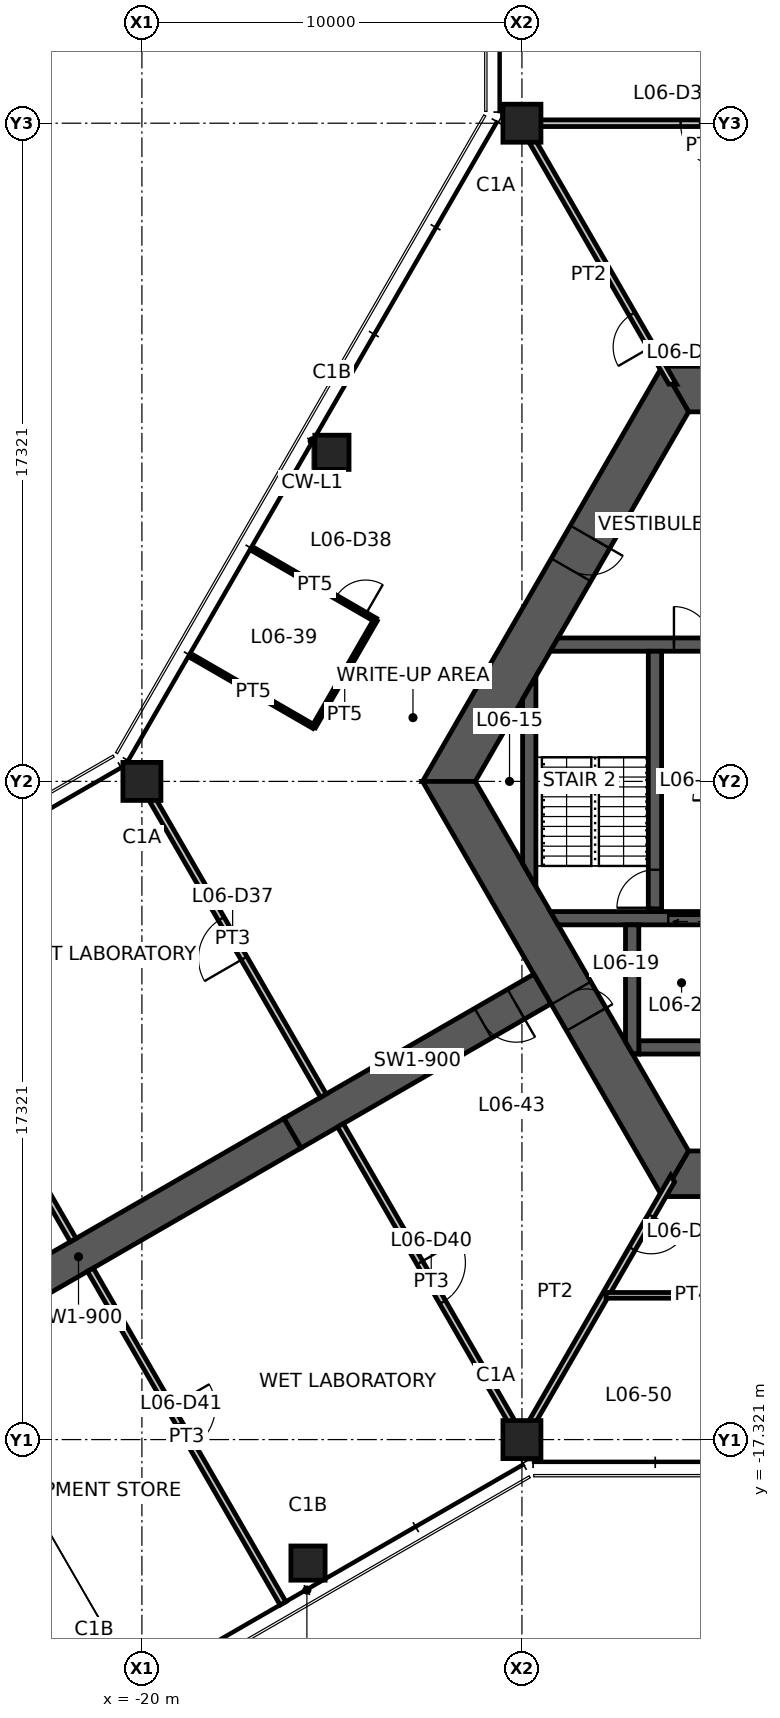
"""IFC4 building model, lengths in metres.
Left out: names, types, materials, properties, quantities, classifications, styles, units other than length and angle.
Written with IfcOpenShell. Run it as: python <this file> out.ifc"""

import sys

from ifc_helpers import new_model, si_unit, direction, frame, frame_2d, origin, origin_2d, place, context, subcontext, project, spatial, polyline, rectangle, hollow_rectangle, outline, extrude, element, fill, save


model = new_model("IFC4")
c1 = context("Model", 3, precision=1e-05, world=origin(), true_north=direction((0.0, 1.0)))
c2 = subcontext(c1, "Body", "Model", "MODEL_VIEW")
j1 = project(units=[si_unit("LENGTHUNIT", "METRE"), si_unit("PLANEANGLEUNIT", "RADIAN")], contexts=[c1])
p1 = place(None, origin())
s1 = spatial("IfcSite", under=j1, at=p1, CompositionType="ELEMENT")
p2 = place(p1, origin())
s2 = spatial("IfcBuilding", under=s1, at=p2, CompositionType="ELEMENT")
p3 = place(p2, frame((0.0, 0.0, 22.6)))
s3 = spatial("IfcBuildingStorey", under=s2, at=p3, CompositionType="ELEMENT", Elevation=22.6)
for number, where, z_axis, x_axis in (
    (1, (-10.0, 17.321, 0.0), (0.0, 0.0, 1.0), (1.0, 0.0, 0.0)),
    (2, (-20.0, 0.0, 0.0), (0.0, 0.0, 1.0), (1.0, 0.0, 0.0)),
    (3, (-10.0, -17.321, 0.0), (0.0, 0.0, 1.0), (1.0, 0.0, 0.0)),
):
    element("IfcColumn", number, at=place(p3, frame(where, z_axis=z_axis, x_axis=x_axis)), inside=s3, PredefinedType="COLUMN", context=c2, shape_type="SweptSolid", body=[
        extrude(hollow_rectangle(XDim=1.0, YDim=1.0, WallThickness=0.06, at=origin_2d()), origin(), (0.0, 0.0, 1.0), 4.2),
    ])
for number, where, z_axis, x_axis in (
    (4, (-15.0, 8.66, 0.0), (0.0, 0.0, 1.0), (1.0, 0.0, 0.0)),
    (5, (-15.629, -20.571, 0.0), (0.0, 0.0, 1.0), (1.0, 0.0, 0.0)),
):
    element("IfcColumn", number, at=place(p3, frame(where, z_axis=z_axis, x_axis=x_axis)), inside=s3, PredefinedType="COLUMN", context=c2, shape_type="SweptSolid", body=[
        extrude(hollow_rectangle(XDim=0.9, YDim=0.9, WallThickness=0.05, at=origin_2d()), origin(), (0.0, 0.0, 1.0), 4.2),
    ])
p4 = place(p3, frame((5.961, 10.325, 0.0), z_axis=(0.0, 0.0, 1.0), x_axis=(-1.0, 0.0, 0.0)))
e6 = element("IfcWall", 6, at=p4, inside=s3, PredefinedType="SHEAR", context=c2, shape_type="SweptSolid", body=[
    extrude(outline(polyline([(-0.346, -0.6), (4.574, -0.6), (5.474, -0.6), (6.449, -0.6), (7.349, -0.6), (12.269, -0.6), (11.576, 0.6), (7.349, 0.6), (6.449, 0.6), (5.474, 0.6), (4.574, 0.6), (0.346, 0.6), (-0.346, -0.6)])), origin(), (0.0, 0.0, 1.0), 4.2),
])
p5 = place(p4, frame((6.449, 0.0, 0.0)))
e7 = element("IfcOpeningElement", 7, at=p5, cuts=e6, PredefinedType="OPENING", context=c2, shape_type="SweptSolid", body=[
    extrude(rectangle(XDim=0.9, YDim=2.1, at=frame_2d((0.45, 1.05))), frame((0.0, 0.61, 0.0), z_axis=(0.0, -1.0, 0.0), x_axis=(1.0, 0.0, 0.0)), (0.0, 0.0, 1.0), 1.22),
])
p6 = place(p4, frame((4.574, 0.0, 0.0)))
e8 = element("IfcOpeningElement", 8, at=p6, cuts=e6, PredefinedType="OPENING", context=c2, shape_type="SweptSolid", body=[
    extrude(rectangle(XDim=0.9, YDim=2.1, at=frame_2d((0.45, 1.05))), frame((0.0, 0.61, 0.0), z_axis=(0.0, -1.0, 0.0), x_axis=(1.0, 0.0, 0.0)), (0.0, 0.0, 1.0), 1.22),
])
p7 = place(p3, frame((-5.961, 10.325, 0.0), z_axis=(0.0, 0.0, 1.0), x_axis=(-0.500004296715, -0.866022923061, 0.0)))
e9 = element("IfcWall", 9, at=p7, inside=s3, PredefinedType="SHEAR", context=c2, shape_type="SweptSolid", body=[
    extrude(outline(polyline([(-0.346, -0.6), (4.494, -0.6), (5.494, -0.6), (12.269, -0.6), (11.576, 0.6), (5.494, 0.6), (4.494, 0.6), (0.346, 0.6), (-0.346, -0.6)])), origin(), (0.0, 0.0, 1.0), 4.2),
])
p8 = place(p7, frame((4.494, 0.0, 0.0)))
e10 = element("IfcOpeningElement", 10, at=p8, cuts=e9, PredefinedType="OPENING", context=c2, shape_type="SweptSolid", body=[
    extrude(rectangle(XDim=1.0, YDim=2.1, at=frame_2d((0.5, 1.05))), frame((0.0, 0.61, 0.0), z_axis=(0.0, -1.0, 0.0), x_axis=(1.0, 0.0, 0.0)), (0.0, 0.0, 1.0), 1.22),
])
p9 = place(p3, frame((-11.922, 0.0, 0.0), z_axis=(0.0, 0.0, 1.0), x_axis=(0.500004296715, -0.866022923061, 0.0)))
e11 = element("IfcWall", 11, at=p9, inside=s3, PredefinedType="SHEAR", context=c2, shape_type="SweptSolid", body=[
    extrude(outline(polyline([(-0.346, -0.6), (6.431, -0.6), (7.231, -0.6), (12.269, -0.6), (11.576, 0.6), (7.231, 0.6), (6.431, 0.6), (0.346, 0.6), (-0.346, -0.6)])), origin(), (0.0, 0.0, 1.0), 4.2),
])
p10 = place(p9, frame((6.431, 0.0, 0.0)))
e12 = element("IfcOpeningElement", 12, at=p10, cuts=e11, PredefinedType="OPENING", context=c2, shape_type="SweptSolid", body=[
    extrude(rectangle(XDim=0.8, YDim=2.1, at=frame_2d((0.4, 1.05))), frame((0.0, 0.61, 0.0), z_axis=(0.0, -1.0, 0.0), x_axis=(1.0, 0.0, 0.0)), (0.0, 0.0, 1.0), 1.22),
])
p11 = place(p3, frame((-5.961, -10.325, 0.0), z_axis=(0.0, 0.0, 1.0), x_axis=(1.0, 0.0, 0.0)))
e13 = element("IfcWall", 13, at=p11, inside=s3, PredefinedType="SHEAR", context=c2, shape_type="SweptSolid", body=[
    extrude(outline(polyline([(-0.346, -0.6), (5.461, -0.6), (6.461, -0.6), (12.269, -0.6), (11.576, 0.6), (6.461, 0.6), (5.461, 0.6), (0.346, 0.6), (-0.346, -0.6)])), origin(), (0.0, 0.0, 1.0), 4.2),
])
p12 = place(p11, frame((5.461, 0.0, 0.0)))
e14 = element("IfcOpeningElement", 14, at=p12, cuts=e13, PredefinedType="OPENING", context=c2, shape_type="SweptSolid", body=[
    extrude(rectangle(XDim=1.0, YDim=2.1, at=frame_2d((0.5, 1.05))), frame((0.0, 0.61, 0.0), z_axis=(0.0, -1.0, 0.0), x_axis=(1.0, 0.0, 0.0)), (0.0, 0.0, 1.0), 1.22),
])
p13 = place(p3, frame((-9.461, -5.462, 0.0), z_axis=(0.0, 0.0, 1.0), x_axis=(-0.866019116917, -0.500010889016, 0.0)))
e15 = element("IfcWall", 15, at=p13, inside=s3, PredefinedType="SHEAR", context=c2, shape_type="SweptSolid", body=[
    extrude(rectangle(XDim=7.595, YDim=0.9, at=frame_2d((3.798, 0.0))), origin(), (0.0, 0.0, 1.0), 4.2),
])
p14 = place(p13, frame((0.8, 0.0, 0.0)))
e16 = element("IfcOpeningElement", 16, at=p14, cuts=e15, PredefinedType="OPENING", context=c2, shape_type="SweptSolid", body=[
    extrude(rectangle(XDim=1.0, YDim=2.1, at=frame_2d((0.5, 1.05))), frame((0.0, 0.46, 0.0), z_axis=(0.0, -1.0, 0.0), x_axis=(1.0, 0.0, 0.0)), (0.0, 0.0, 1.0), 0.92),
])
p15 = place(p3, frame((-16.039, -9.26, 0.0), z_axis=(0.0, 0.0, 1.0), x_axis=(-0.866024837091, -0.50000098154, 0.0)))
e17 = element("IfcWall", 17, at=p15, inside=s3, PredefinedType="SHEAR", context=c2, shape_type="SweptSolid", body=[
    extrude(rectangle(XDim=13.0, YDim=0.9, at=frame_2d((6.5, 0.0))), origin(), (0.0, 0.0, 1.0), 4.2),
])
p16 = place(p3, frame((-9.151, 3.6, 0.0), z_axis=(0.0, 0.0, 1.0), x_axis=(1.0, 0.0, 0.0)))
e18 = element("IfcWall", 18, at=p16, inside=s3, PredefinedType="SHEAR", context=c2, shape_type="SweptSolid", body=[
    extrude(outline(polyline([(-0.101, -0.175), (3.151, -0.175), (4.151, -0.175), (7.726, -0.175), (7.726, 0.175), (4.151, 0.175), (3.151, 0.175), (0.101, 0.175), (-0.101, -0.175)])), origin(), (0.0, 0.0, 1.0), 4.2),
])
p17 = place(p16, frame((3.151, 0.0, 0.0)))
e19 = element("IfcOpeningElement", 19, at=p17, cuts=e18, PredefinedType="OPENING", context=c2, shape_type="SweptSolid", body=[
    extrude(rectangle(XDim=1.0, YDim=2.1, at=frame_2d((0.5, 1.05))), frame((0.0, 0.185, 0.0), z_axis=(0.0, -1.0, 0.0), x_axis=(1.0, 0.0, 0.0)), (0.0, 0.0, 1.0), 0.37),
])
p18 = place(p3, frame((-9.151, -3.6, 0.0), z_axis=(0.0, 0.0, 1.0), x_axis=(1.0, 0.0, 0.0)))
e20 = element("IfcWall", 20, at=p18, inside=s3, PredefinedType="SHEAR", context=c2, shape_type="SweptSolid", body=[
    extrude(outline(polyline([(0.101, -0.175), (3.001, -0.175), (4.301, -0.175), (7.726, -0.175), (7.726, 0.175), (4.301, 0.175), (3.001, 0.175), (-0.101, 0.175), (0.101, -0.175)])), origin(), (0.0, 0.0, 1.0), 4.2),
])
p19 = place(p18, frame((3.001, 0.0, 0.0)))
e21 = element("IfcOpeningElement", 21, at=p19, cuts=e20, PredefinedType="OPENING", context=c2, shape_type="SweptSolid", body=[
    extrude(rectangle(XDim=1.3, YDim=2.1, at=frame_2d((0.65, 1.05))), frame((0.0, 0.185, 0.0), z_axis=(0.0, -1.0, 0.0), x_axis=(1.0, 0.0, 0.0)), (0.0, 0.0, 1.0), 0.37),
])
p20 = place(p3, frame((-6.5, -3.425, 0.0), z_axis=(0.0, 0.0, 1.0), x_axis=(0.0, 1.0, 0.0)))
e22 = element("IfcWall", 22, at=p20, inside=s3, PredefinedType="SHEAR", context=c2, shape_type="SweptSolid", body=[
    extrude(rectangle(XDim=6.85, YDim=0.35, at=frame_2d((3.425, 0.0))), origin(), (0.0, 0.0, 1.0), 4.2),
])
p21 = place(p20, frame((0.1, 0.0, 0.0)))
e23 = element("IfcOpeningElement", 23, at=p21, cuts=e22, PredefinedType="OPENING", context=c2, shape_type="SweptSolid", body=[
    extrude(rectangle(XDim=1.0, YDim=2.1, at=frame_2d((0.5, 1.05))), frame((0.0, 0.185, 0.0), z_axis=(0.0, -1.0, 0.0), x_axis=(1.0, 0.0, 0.0)), (0.0, 0.0, 1.0), 0.37),
])
p22 = place(p3, frame((-6.925, -7.0, 0.0), z_axis=(0.0, 0.0, 1.0), x_axis=(1.0, 0.0, 0.0)))
e24 = element("IfcWall", 24, at=p22, inside=s3, PredefinedType="SHEAR", context=c2, shape_type="SweptSolid", body=[
    extrude(rectangle(XDim=2.25, YDim=0.35, at=frame_2d((1.125, 0.0))), origin(), (0.0, 0.0, 1.0), 4.2),
])
p23 = place(p3, frame((-7.1, -3.775, 0.0), z_axis=(0.0, 0.0, 1.0), x_axis=(0.0, -1.0, 0.0)))
e25 = element("IfcWall", 25, at=p23, inside=s3, PredefinedType="SHEAR", context=c2, shape_type="SweptSolid", body=[
    extrude(outline(polyline([(0.0, -0.175), (3.074, -0.175), (3.377, 0.0), (3.4, 0.175), (0.0, 0.175), (0.0, -0.175)])), origin(), (0.0, 0.0, 1.0), 4.2),
])
p24 = place(p3, frame((-9.808, -2.462, 0.0), z_axis=(0.0, 0.0, 1.0), x_axis=(0.0, 1.0, 0.0)))
e26 = element("IfcWall", 26, at=p24, inside=s3, PredefinedType="SHEAR", context=c2, shape_type="SweptSolid", body=[
    extrude(outline(polyline([(-0.303, -0.175), (5.228, -0.175), (4.621, 0.175), (0.303, 0.175), (-0.303, -0.175)])), origin(), (0.0, 0.0, 1.0), 4.2),
])
p25 = place(p3, frame((-6.035, 10.453, 0.0), z_axis=(0.0, 0.0, 1.0), x_axis=(-0.499993402427, 0.866029212861, 0.0)))
e27 = element("IfcWall", 27, at=p25, inside=s3, PredefinedType="PARTITIONING", context=c2, shape_type="SweptSolid", body=[
    extrude(outline(polyline([(-0.051, -0.087), (1.129, -0.087), (2.129, -0.087), (7.93, -0.087), (7.93, 0.087), (2.129, 0.087), (1.129, 0.087), (0.051, 0.087), (-0.051, -0.087)])), origin(), (0.0, 0.0, 1.0), 3.3),
])
p26 = place(p25, frame((1.129, 0.0, 0.0)))
e28 = element("IfcOpeningElement", 28, at=p26, cuts=e27, PredefinedType="OPENING", context=c2, shape_type="SweptSolid", body=[
    extrude(rectangle(XDim=1.0, YDim=2.1, at=frame_2d((0.5, 1.05))), frame((0.0, 0.098, 0.0), z_axis=(0.0, -1.0, 0.0), x_axis=(1.0, 0.0, 0.0)), (0.0, 0.0, 1.0), 0.195),
])
p27 = place(p3, frame((-6.035, -10.453, 0.0), z_axis=(0.0, 0.0, 1.0), x_axis=(-0.499993402427, -0.866029212861, 0.0)))
e29 = element("IfcWall", 29, at=p27, inside=s3, PredefinedType="PARTITIONING", context=c2, shape_type="SweptSolid", body=[
    extrude(outline(polyline([(-0.051, -0.087), (1.129, -0.087), (2.129, -0.087), (7.93, -0.087), (7.93, 0.087), (2.129, 0.087), (1.129, 0.087), (0.051, 0.087), (-0.051, -0.087)])), origin(), (0.0, 0.0, 1.0), 3.3),
])
p28 = place(p27, frame((1.129, 0.0, 0.0)))
e30 = element("IfcOpeningElement", 30, at=p28, cuts=e29, PredefinedType="OPENING", context=c2, shape_type="SweptSolid", body=[
    extrude(rectangle(XDim=1.0, YDim=2.1, at=frame_2d((0.5, 1.05))), frame((0.0, 0.098, 0.0), z_axis=(0.0, -1.0, 0.0), x_axis=(1.0, 0.0, 0.0)), (0.0, 0.0, 1.0), 0.195),
])
p29 = place(p3, frame((-0.45, 17.321, 0.0), z_axis=(0.0, 0.0, 1.0), x_axis=(-1.0, 0.0, 0.0)))
e31 = element("IfcWall", 31, at=p29, inside=s3, PredefinedType="PARTITIONING", context=c2, shape_type="SweptSolid", body=[
    extrude(rectangle(XDim=9.55, YDim=0.175, at=frame_2d((4.775, 0.0))), origin(), (0.0, 0.0, 1.0), 3.208),
])
p30 = place(p29, frame((4.175, 0.0, 0.0)))
e32 = element("IfcOpeningElement", 32, at=p30, cuts=e31, PredefinedType="OPENING", context=c2, shape_type="SweptSolid", body=[
    extrude(rectangle(XDim=1.2, YDim=2.1, at=frame_2d((0.6, 1.05))), frame((0.0, 0.098, 0.0), z_axis=(0.0, -1.0, 0.0), x_axis=(1.0, 0.0, 0.0)), (0.0, 0.0, 1.0), 0.195),
])
p31 = place(p3, frame((-15.225, -8.271, 0.0), z_axis=(0.0, 0.0, 1.0), x_axis=(-0.499993908199, 0.866028920859, 0.0)))
e33 = element("IfcWall", 33, at=p31, inside=s3, PredefinedType="PARTITIONING", context=c2, shape_type="SweptSolid", body=[
    extrude(rectangle(XDim=9.55, YDim=0.175, at=frame_2d((4.775, 0.0))), origin(), (0.0, 0.0, 1.0), 3.208),
])
p32 = place(p31, frame((4.175, 0.0, 0.0)))
e34 = element("IfcOpeningElement", 34, at=p32, cuts=e33, PredefinedType="OPENING", context=c2, shape_type="SweptSolid", body=[
    extrude(rectangle(XDim=1.2, YDim=2.1, at=frame_2d((0.6, 1.05))), frame((0.0, 0.098, 0.0), z_axis=(0.0, -1.0, 0.0), x_axis=(1.0, 0.0, 0.0)), (0.0, 0.0, 1.0), 0.195),
])
p33 = place(p3, frame((-17.048, 6.094, 0.0), z_axis=(0.0, 0.0, 1.0), x_axis=(0.866040157966, -0.499974444137, 0.0)))
e35 = element("IfcWall", 35, at=p33, inside=s3, PredefinedType="PARTITIONING", context=c2, shape_type="SweptSolid", body=[
    extrude(rectangle(XDim=3.69, YDim=0.1, at=frame_2d((1.845, 0.0))), origin(), (0.0, 0.0, 1.0), 3.2),
])
p34 = place(p33, frame((2.49, 0.0, 0.0)))
e36 = element("IfcOpeningElement", 36, at=p34, cuts=e35, PredefinedType="OPENING", context=c2, shape_type="SweptSolid", body=[
    extrude(rectangle(XDim=0.9, YDim=2.1, at=frame_2d((0.45, 1.05))), frame((0.0, 0.06, 0.0), z_axis=(0.0, -1.0, 0.0), x_axis=(1.0, 0.0, 0.0)), (0.0, 0.0, 1.0), 0.12),
])
p35 = place(p3, frame((-15.475, 1.437, 0.0), z_axis=(0.0, 0.0, 1.0), x_axis=(-0.866017659399, 0.500013413428, 0.0)))
e37 = element("IfcWall", 37, at=p35, inside=s3, PredefinedType="PARTITIONING", context=c2, shape_type="SweptSolid", body=[
    extrude(rectangle(XDim=3.68, YDim=0.1, at=frame_2d((1.84, 0.0))), origin(), (0.0, 0.0, 1.0), 3.2),
])
p36 = place(p3, frame((-13.852, 4.249, 0.0), z_axis=(0.0, 0.0, 1.0), x_axis=(-0.500013214685, -0.866017774148, 0.0)))
e38 = element("IfcWall", 38, at=p36, inside=s3, PredefinedType="PARTITIONING", context=c2, shape_type="SweptSolid", body=[
    extrude(rectangle(XDim=3.247, YDim=0.1, at=frame_2d((1.623, 0.0))), origin(), (0.0, 0.0, 1.0), 3.2),
])
p37 = place(p3, frame((-21.807, -12.071, 0.0), z_axis=(0.0, 0.0, 1.0), x_axis=(-0.499994227129, 0.866028736727, 0.0)))
e39 = element("IfcWall", 39, at=p37, inside=s3, PredefinedType="PARTITIONING", context=c2, shape_type="SweptSolid", body=[
    extrude(rectangle(XDim=10.135, YDim=0.175, at=frame_2d((5.067, 0.0))), origin(), (0.0, 0.0, 1.0), 4.0),
])
p38 = place(p37, frame((4.175, 0.0, 0.0)))
e40 = element("IfcOpeningElement", 40, at=p38, cuts=e39, PredefinedType="OPENING", context=c2, shape_type="SweptSolid", body=[
    extrude(rectangle(XDim=1.2, YDim=2.1, at=frame_2d((0.6, 1.05))), frame((0.0, 0.098, 0.0), z_axis=(0.0, -1.0, 0.0), x_axis=(1.0, 0.0, 0.0)), (0.0, 0.0, 1.0), 0.195),
])
p39 = place(p3, frame((-14.775, -9.05, 0.0), z_axis=(0.0, 0.0, 1.0), x_axis=(0.499993908199, -0.866028920859, 0.0)))
e41 = element("IfcWall", 41, at=p39, inside=s3, PredefinedType="PARTITIONING", context=c2, shape_type="SweptSolid", body=[
    extrude(rectangle(XDim=9.55, YDim=0.175, at=frame_2d((4.775, 0.0))), origin(), (0.0, 0.0, 1.0), 3.208),
])
p40 = place(p39, frame((4.175, 0.0, 0.0)))
e42 = element("IfcOpeningElement", 42, at=p40, cuts=e41, PredefinedType="OPENING", context=c2, shape_type="SweptSolid", body=[
    extrude(rectangle(XDim=1.2, YDim=2.1, at=frame_2d((0.6, 1.05))), frame((0.0, 0.098, 0.0), z_axis=(0.0, -1.0, 0.0), x_axis=(1.0, 0.0, 0.0)), (0.0, 0.0, 1.0), 0.195),
])
p41 = place(p3, frame((-21.357, -12.85, 0.0), z_axis=(0.0, 0.0, 1.0), x_axis=(0.499987145745, -0.866032825065, 0.0)))
e43 = element("IfcWall", 43, at=p41, inside=s3, PredefinedType="PARTITIONING", context=c2, shape_type="SweptSolid", body=[
    extrude(rectangle(XDim=10.14, YDim=0.175, at=frame_2d((5.07, 0.0))), origin(), (0.0, 0.0, 1.0), 4.0),
])
p42 = place(p41, frame((4.175, 0.0, 0.0)))
e44 = element("IfcOpeningElement", 44, at=p42, cuts=e43, PredefinedType="OPENING", context=c2, shape_type="SweptSolid", body=[
    extrude(rectangle(XDim=1.2, YDim=2.1, at=frame_2d((0.6, 1.05))), frame((0.0, 0.098, 0.0), z_axis=(0.0, -1.0, 0.0), x_axis=(1.0, 0.0, 0.0)), (0.0, 0.0, 1.0), 0.195),
])
p43 = place(p3, frame((-3.241, -13.525, 0.0), z_axis=(0.0, 0.0, 1.0), x_axis=(-1.0, 0.0, 0.0)))
e45 = element("IfcWall", 45, at=p43, inside=s3, PredefinedType="PARTITIONING", context=c2, shape_type="SweptSolid", body=[
    extrude(rectangle(XDim=4.544, YDim=0.15, at=frame_2d((2.272, 0.0))), origin(), (0.0, 0.0, 1.0), 3.2),
])
p44 = place(p10, origin())
e46 = element("IfcDoor", 46, at=p44, inside=s3, OperationType="SINGLE_SWING_RIGHT", PredefinedType="DOOR", context=c2, shape_type="SweptSolid", body=[
    extrude(rectangle(XDim=0.8, YDim=2.1, at=frame_2d((0.4, 1.05))), frame((0.0, 0.025, 0.0), z_axis=(0.0, -1.0, 0.0), x_axis=(1.0, 0.0, 0.0)), (0.0, 0.0, 1.0), 0.05),
])
fill(e12, e46)
p45 = place(p8, origin())
e47 = element("IfcDoor", 47, at=p45, inside=s3, OperationType="SINGLE_SWING_LEFT", PredefinedType="DOOR", context=c2, shape_type="SweptSolid", body=[
    extrude(rectangle(XDim=1.0, YDim=2.1, at=frame_2d((0.5, 1.05))), frame((0.0, 0.025, 0.0), z_axis=(0.0, -1.0, 0.0), x_axis=(1.0, 0.0, 0.0)), (0.0, 0.0, 1.0), 0.05),
])
fill(e10, e47)
p46 = place(p21, origin())
e48 = element("IfcDoor", 48, at=p46, inside=s3, OperationType="SINGLE_SWING_LEFT", PredefinedType="DOOR", context=c2, shape_type="SweptSolid", body=[
    extrude(rectangle(XDim=1.0, YDim=2.1, at=frame_2d((0.5, 1.05))), frame((0.0, 0.025, 0.0), z_axis=(0.0, -1.0, 0.0), x_axis=(1.0, 0.0, 0.0)), (0.0, 0.0, 1.0), 0.05),
])
fill(e23, e48)
p47 = place(p17, origin())
e49 = element("IfcDoor", 49, at=p47, inside=s3, OperationType="SINGLE_SWING_LEFT", PredefinedType="DOOR", context=c2, shape_type="SweptSolid", body=[
    extrude(rectangle(XDim=1.0, YDim=2.1, at=frame_2d((0.5, 1.05))), frame((0.0, 0.025, 0.0), z_axis=(0.0, -1.0, 0.0), x_axis=(1.0, 0.0, 0.0)), (0.0, 0.0, 1.0), 0.05),
])
fill(e19, e49)
p48 = place(p14, origin())
e50 = element("IfcDoor", 50, at=p48, inside=s3, OperationType="SINGLE_SWING_LEFT", PredefinedType="DOOR", context=c2, shape_type="SweptSolid", body=[
    extrude(rectangle(XDim=1.0, YDim=2.1, at=frame_2d((0.5, 1.05))), frame((0.0, 0.025, 0.0), z_axis=(0.0, -1.0, 0.0), x_axis=(1.0, 0.0, 0.0)), (0.0, 0.0, 1.0), 0.05),
])
fill(e16, e50)
p49 = place(p26, origin())
e51 = element("IfcDoor", 51, at=p49, inside=s3, OperationType="SINGLE_SWING_LEFT", PredefinedType="DOOR", context=c2, shape_type="SweptSolid", body=[
    extrude(rectangle(XDim=1.0, YDim=2.1, at=frame_2d((0.5, 1.05))), frame((0.0, 0.025, 0.0), z_axis=(0.0, -1.0, 0.0), x_axis=(1.0, 0.0, 0.0)), (0.0, 0.0, 1.0), 0.05),
])
fill(e28, e51)
p50 = place(p28, origin())
e52 = element("IfcDoor", 52, at=p50, inside=s3, OperationType="SINGLE_SWING_LEFT", PredefinedType="DOOR", context=c2, shape_type="SweptSolid", body=[
    extrude(rectangle(XDim=1.0, YDim=2.1, at=frame_2d((0.5, 1.05))), frame((0.0, 0.025, 0.0), z_axis=(0.0, -1.0, 0.0), x_axis=(1.0, 0.0, 0.0)), (0.0, 0.0, 1.0), 0.05),
])
fill(e30, e52)
p51 = place(p30, origin())
e53 = element("IfcDoor", 53, at=p51, inside=s3, OperationType="DOUBLE_DOOR_SINGLE_SWING", PredefinedType="DOOR", context=c2, shape_type="SweptSolid", body=[
    extrude(rectangle(XDim=1.2, YDim=2.1, at=frame_2d((0.6, 1.05))), frame((0.0, 0.025, 0.0), z_axis=(0.0, -1.0, 0.0), x_axis=(1.0, 0.0, 0.0)), (0.0, 0.0, 1.0), 0.05),
])
fill(e32, e53)
p52 = place(p32, origin())
e54 = element("IfcDoor", 54, at=p52, inside=s3, OperationType="DOUBLE_DOOR_SINGLE_SWING", PredefinedType="DOOR", context=c2, shape_type="SweptSolid", body=[
    extrude(rectangle(XDim=1.2, YDim=2.1, at=frame_2d((0.6, 1.05))), frame((0.0, 0.025, 0.0), z_axis=(0.0, -1.0, 0.0), x_axis=(1.0, 0.0, 0.0)), (0.0, 0.0, 1.0), 0.05),
])
fill(e34, e54)
p53 = place(p34, origin())
e55 = element("IfcDoor", 55, at=p53, inside=s3, OperationType="SINGLE_SWING_RIGHT", PredefinedType="DOOR", context=c2, shape_type="SweptSolid", body=[
    extrude(rectangle(XDim=0.9, YDim=2.1, at=frame_2d((0.45, 1.05))), frame((0.0, 0.025, 0.0), z_axis=(0.0, -1.0, 0.0), x_axis=(1.0, 0.0, 0.0)), (0.0, 0.0, 1.0), 0.05),
])
fill(e36, e55)
p54 = place(p40, origin())
e56 = element("IfcDoor", 56, at=p54, inside=s3, OperationType="DOUBLE_DOOR_SINGLE_SWING", PredefinedType="DOOR", context=c2, shape_type="SweptSolid", body=[
    extrude(rectangle(XDim=1.2, YDim=2.1, at=frame_2d((0.6, 1.05))), frame((0.0, 0.025, 0.0), z_axis=(0.0, -1.0, 0.0), x_axis=(1.0, 0.0, 0.0)), (0.0, 0.0, 1.0), 0.05),
])
fill(e42, e56)
p55 = place(p42, origin())
e57 = element("IfcDoor", 57, at=p55, inside=s3, OperationType="DOUBLE_DOOR_SINGLE_SWING", PredefinedType="DOOR", context=c2, shape_type="SweptSolid", body=[
    extrude(rectangle(XDim=1.2, YDim=2.1, at=frame_2d((0.6, 1.05))), frame((0.0, 0.025, 0.0), z_axis=(0.0, -1.0, 0.0), x_axis=(1.0, 0.0, 0.0)), (0.0, 0.0, 1.0), 0.05),
])
fill(e44, e57)
p56 = place(p19, origin())
e58 = element("IfcDoor", 58, at=p56, inside=s3, OperationType="DOUBLE_DOOR_SLIDING", PredefinedType="DOOR", context=c2, shape_type="SweptSolid", body=[
    extrude(rectangle(XDim=1.3, YDim=2.1, at=frame_2d((0.65, 1.05))), frame((0.0, 0.025, 0.0), z_axis=(0.0, -1.0, 0.0), x_axis=(1.0, 0.0, 0.0)), (0.0, 0.0, 1.0), 0.05),
])
fill(e21, e58)
save(model, sys.argv[1])
